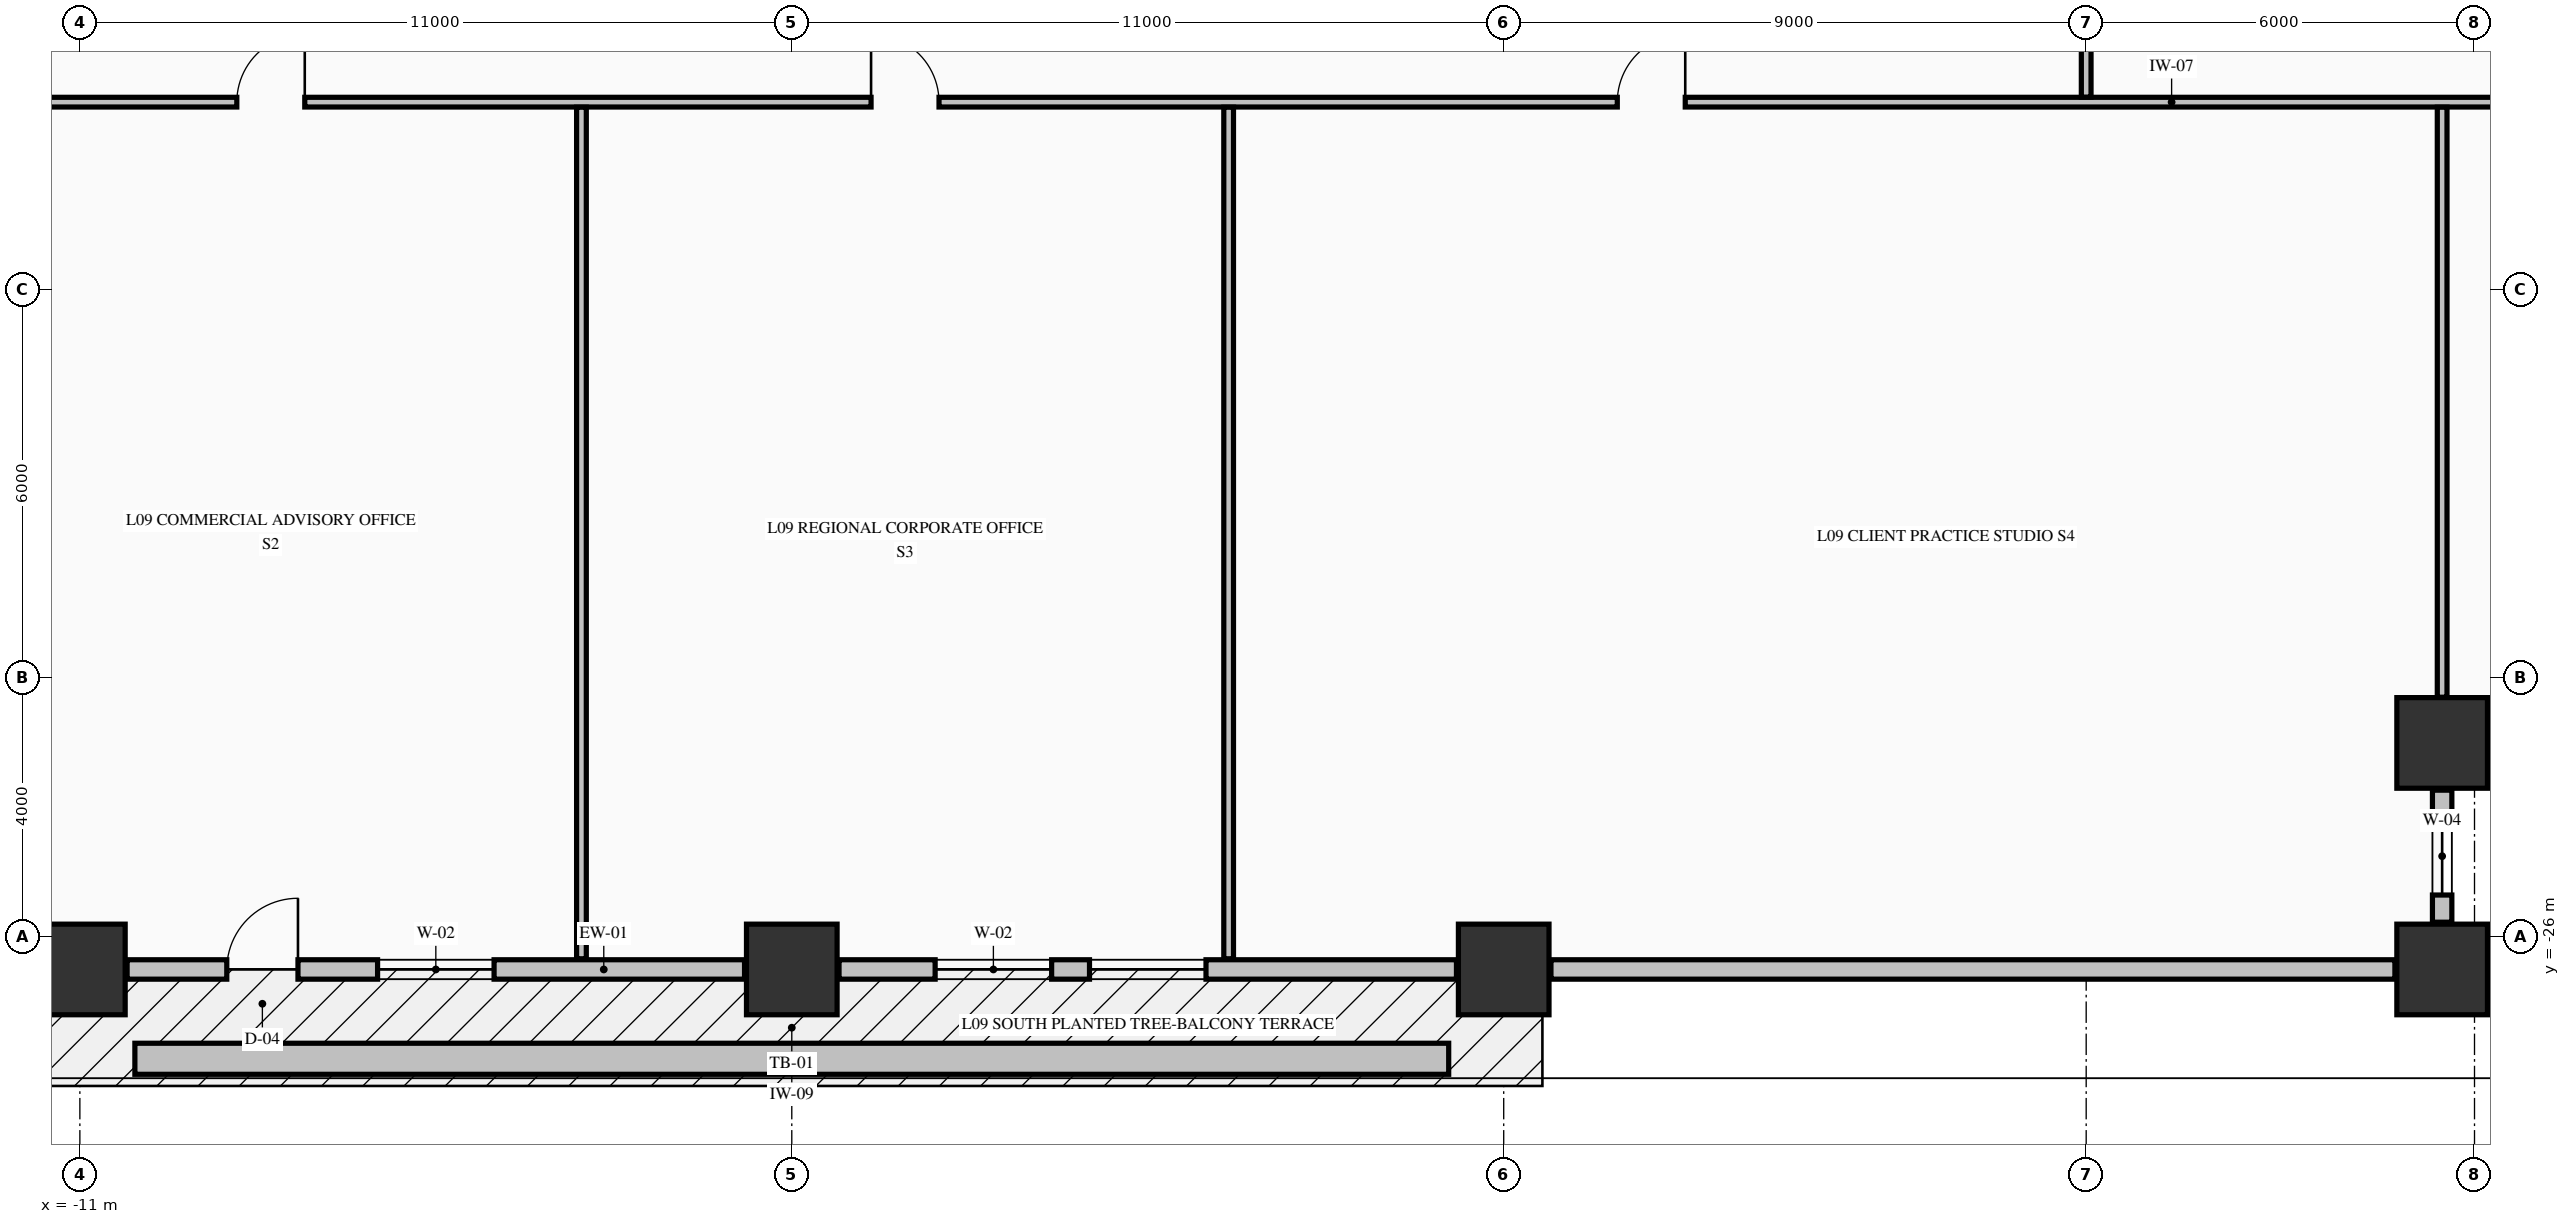
"""IFC4 building model, lengths in metres.
Left out: names, types, materials, properties, quantities, classifications, styles, units other than length and angle.
Written with IfcOpenShell. Run it as: python <this file> out.ifc"""

import sys

from ifc_helpers import new_model, si_unit, direction, frame, frame_2d, origin, origin_2d, place, context, subcontext, project, spatial, rectangle, extrude, element, fill, save


model = new_model("IFC4")
c1 = context("Model", 3, precision=1e-05, world=origin(), true_north=direction((0.0, 1.0)))
c2 = subcontext(c1, "Body", "Model", "MODEL_VIEW")
j1 = project(units=[si_unit("LENGTHUNIT", "METRE"), si_unit("PLANEANGLEUNIT", "RADIAN")], contexts=[c1])
p1 = place(None, origin())
s1 = spatial("IfcSite", under=j1, at=p1, CompositionType="ELEMENT")
p2 = place(p1, origin())
s2 = spatial("IfcBuilding", under=s1, at=p2, CompositionType="ELEMENT")
p3 = place(p2, frame((0.0, 0.0, 41.48)))
s3 = spatial("IfcBuildingStorey", under=s2, at=p3, CompositionType="ELEMENT", Elevation=41.48)
for number, where, z_axis, x_axis in (
    (1, (-11.0, -26.5, -0.25), (0.0, 0.0, 1.0), (1.0, 0.0, 0.0)),
    (2, (0.0, -26.5, -0.25), (0.0, 0.0, 1.0), (1.0, 0.0, 0.0)),
    (3, (11.0, -26.5, -0.25), (0.0, 0.0, 1.0), (1.0, 0.0, 0.0)),
    (4, (25.5, -26.5, -0.25), (0.0, 0.0, 1.0), (1.0, 0.0, 0.0)),
    (5, (25.5, -23.0, -0.25), (0.0, 0.0, 1.0), (1.0, 0.0, 0.0)),
):
    element("IfcColumn", number, at=place(p3, frame(where, z_axis=z_axis, x_axis=x_axis)), inside=s3, PredefinedType="COLUMN", context=c2, shape_type="SweptSolid", body=[
        extrude(rectangle(XDim=1.4, YDim=1.4, at=origin_2d()), origin(), (0.0, 0.0, 1.0), 3.57),
    ])
p4 = place(p3, frame((25.5, -25.77, 0.0), z_axis=(0.0, 0.0, 1.0), x_axis=(0.0, 1.0, 0.0)))
e6 = element("IfcWall", 6, at=p4, inside=s3, PredefinedType="STANDARD", context=c2, shape_type="SweptSolid", body=[
    extrude(rectangle(XDim=2.04, YDim=0.3, at=frame_2d((1.02, 0.0))), origin(), (0.0, 0.0, 1.0), 2.712),
])
p5 = place(p4, frame((0.42, 0.0, 0.82)))
e7 = element("IfcOpeningElement", 7, at=p5, cuts=e6, PredefinedType="OPENING", context=c2, shape_type="SweptSolid", body=[
    extrude(rectangle(XDim=1.2, YDim=1.65, at=frame_2d((0.6, 0.825))), frame((0.0, 0.16, 0.0), z_axis=(0.0, -1.0, 0.0), x_axis=(1.0, 0.0, 0.0)), (0.0, 0.0, 1.0), 0.32),
])
p6 = place(p3, frame((26.23, -23.0, 0.0), z_axis=(0.0, 0.0, 1.0), x_axis=(1.0, 0.0, 0.0)))
e8 = element("IfcWall", 8, at=p6, inside=s3, PredefinedType="STANDARD", context=c2, shape_type="SweptSolid", body=[
    extrude(rectangle(XDim=2.04, YDim=0.3, at=frame_2d((1.02, 0.0))), origin(), (0.0, 0.0, 1.0), 2.712),
])
p7 = place(p6, frame((0.42, 0.0, 0.82)))
e9 = element("IfcOpeningElement", 9, at=p7, cuts=e8, PredefinedType="OPENING", context=c2, shape_type="SweptSolid", body=[
    extrude(rectangle(XDim=1.2, YDim=1.65, at=frame_2d((0.6, 0.825))), frame((0.0, 0.16, 0.0), z_axis=(0.0, -1.0, 0.0), x_axis=(1.0, 0.0, 0.0)), (0.0, 0.0, 1.0), 0.32),
])
p8 = place(p3, frame((-10.27, -26.5, 0.0), z_axis=(0.0, 0.0, 1.0), x_axis=(1.0, 0.0, 0.0)))
e10 = element("IfcWall", 10, at=p8, inside=s3, PredefinedType="STANDARD", context=c2, shape_type="SweptSolid", body=[
    extrude(rectangle(XDim=9.54, YDim=0.3, at=frame_2d((4.77, 0.0))), origin(), (0.0, 0.0, 1.0), 2.712),
])
p9 = place(p8, frame((1.54, 0.0, 0.0)))
e11 = element("IfcOpeningElement", 11, at=p9, cuts=e10, PredefinedType="OPENING", context=c2, shape_type="SweptSolid", body=[
    extrude(rectangle(XDim=1.1, YDim=2.15, at=frame_2d((0.55, 1.075))), frame((0.0, 0.16, 0.0), z_axis=(0.0, -1.0, 0.0), x_axis=(1.0, 0.0, 0.0)), (0.0, 0.0, 1.0), 0.32),
])
p10 = place(p8, frame((3.87, 0.0, 0.78)))
e12 = element("IfcOpeningElement", 12, at=p10, cuts=e10, PredefinedType="OPENING", context=c2, shape_type="SweptSolid", body=[
    extrude(rectangle(XDim=1.8, YDim=1.72, at=frame_2d((0.9, 0.86))), frame((0.0, 0.16, 0.0), z_axis=(0.0, -1.0, 0.0), x_axis=(1.0, 0.0, 0.0)), (0.0, 0.0, 1.0), 0.32),
])
p11 = place(p3, frame((0.73, -26.5, 0.0), z_axis=(0.0, 0.0, 1.0), x_axis=(1.0, 0.0, 0.0)))
e13 = element("IfcWall", 13, at=p11, inside=s3, PredefinedType="STANDARD", context=c2, shape_type="SweptSolid", body=[
    extrude(rectangle(XDim=9.54, YDim=0.3, at=frame_2d((4.77, 0.0))), origin(), (0.0, 0.0, 1.0), 2.712),
])
p12 = place(p11, frame((1.485, 0.0, 0.78)))
e14 = element("IfcOpeningElement", 14, at=p12, cuts=e13, PredefinedType="OPENING", context=c2, shape_type="SweptSolid", body=[
    extrude(rectangle(XDim=1.8, YDim=1.72, at=frame_2d((0.9, 0.86))), frame((0.0, 0.16, 0.0), z_axis=(0.0, -1.0, 0.0), x_axis=(1.0, 0.0, 0.0)), (0.0, 0.0, 1.0), 0.32),
])
p13 = place(p11, frame((3.87, 0.0, 0.78)))
e15 = element("IfcOpeningElement", 15, at=p13, cuts=e13, PredefinedType="OPENING", context=c2, shape_type="SweptSolid", body=[
    extrude(rectangle(XDim=1.8, YDim=1.72, at=frame_2d((0.9, 0.86))), frame((0.0, 0.16, 0.0), z_axis=(0.0, -1.0, 0.0), x_axis=(1.0, 0.0, 0.0)), (0.0, 0.0, 1.0), 0.32),
])
p14 = place(p3, frame((11.73, -26.5, 0.0), z_axis=(0.0, 0.0, 1.0), x_axis=(1.0, 0.0, 0.0)))
e16 = element("IfcWall", 16, at=p14, inside=s3, PredefinedType="STANDARD", context=c2, shape_type="SweptSolid", body=[
    extrude(rectangle(XDim=13.04, YDim=0.3, at=frame_2d((6.52, 0.0))), origin(), (0.0, 0.0, 1.0), 2.712),
])
p15 = place(p3, frame((-23.835, -13.1, 0.0), z_axis=(0.0, 0.0, 1.0), x_axis=(1.0, 0.0, 0.0)))
e17 = element("IfcWall", 17, at=p15, inside=s3, PredefinedType="PARTITIONING", context=c2, shape_type="SweptSolid", body=[
    extrude(rectangle(XDim=52.67, YDim=0.15, at=frame_2d((26.335, 0.0))), origin(), (0.0, 0.0, 1.0), 3.32),
])
p16 = place(p15, frame((6.99, 0.0, 0.0)))
e18 = element("IfcOpeningElement", 18, at=p16, cuts=e17, PredefinedType="OPENING", context=c2, shape_type="SweptSolid", body=[
    extrude(rectangle(XDim=1.05, YDim=2.15, at=frame_2d((0.525, 1.075))), frame((0.0, 0.085, 0.0), z_axis=(0.0, -1.0, 0.0), x_axis=(1.0, 0.0, 0.0)), (0.0, 0.0, 1.0), 0.17),
])
p17 = place(p15, frame((15.26, 0.0, 0.0)))
e19 = element("IfcOpeningElement", 19, at=p17, cuts=e17, PredefinedType="OPENING", context=c2, shape_type="SweptSolid", body=[
    extrude(rectangle(XDim=1.05, YDim=2.15, at=frame_2d((0.525, 1.075))), frame((0.0, 0.085, 0.0), z_axis=(0.0, -1.0, 0.0), x_axis=(1.0, 0.0, 0.0)), (0.0, 0.0, 1.0), 0.17),
])
p18 = place(p15, frame((25.06, 0.0, 0.0)))
e20 = element("IfcOpeningElement", 20, at=p18, cuts=e17, PredefinedType="OPENING", context=c2, shape_type="SweptSolid", body=[
    extrude(rectangle(XDim=1.05, YDim=2.15, at=frame_2d((0.525, 1.075))), frame((0.0, 0.085, 0.0), z_axis=(0.0, -1.0, 0.0), x_axis=(1.0, 0.0, 0.0)), (0.0, 0.0, 1.0), 0.17),
])
p19 = place(p15, frame((36.59, 0.0, 0.0)))
e21 = element("IfcOpeningElement", 21, at=p19, cuts=e17, PredefinedType="OPENING", context=c2, shape_type="SweptSolid", body=[
    extrude(rectangle(XDim=1.05, YDim=2.15, at=frame_2d((0.525, 1.075))), frame((0.0, 0.085, 0.0), z_axis=(0.0, -1.0, 0.0), x_axis=(1.0, 0.0, 0.0)), (0.0, 0.0, 1.0), 0.17),
])
for number, where, z_axis, x_axis in (
    (22, (-3.25, -26.335, 0.0), (0.0, 0.0, 1.0), (0.0, 1.0, 0.0)),
    (23, (6.75, -26.335, 0.0), (0.0, 0.0, 1.0), (0.0, 1.0, 0.0)),
):
    element("IfcWall", number, at=place(p3, frame(where, z_axis=z_axis, x_axis=x_axis)), inside=s3, PredefinedType="PARTITIONING", context=c2, shape_type="SweptSolid", body=[
        extrude(rectangle(XDim=13.157, YDim=0.15, at=frame_2d((6.579, 0.0))), origin(), (0.0, 0.0, 1.0), 3.32),
    ])
p20 = place(p3, frame((20.0, -13.022, 0.0), z_axis=(0.0, 0.0, 1.0), x_axis=(0.0, 1.0, 0.0)))
e24 = element("IfcWall", 24, at=p20, inside=s3, PredefinedType="PARTITIONING", context=c2, shape_type="SweptSolid", body=[
    extrude(rectangle(XDim=2.466, YDim=0.15, at=frame_2d((1.233, 0.0))), origin(), (0.0, 0.0, 1.0), 2.66),
])
p21 = place(p20, frame((1.027, 0.0, 0.0)))
e25 = element("IfcOpeningElement", 25, at=p21, cuts=e24, PredefinedType="OPENING", context=c2, shape_type="SweptSolid", body=[
    extrude(rectangle(XDim=0.95, YDim=2.15, at=frame_2d((0.475, 1.075))), frame((0.0, 0.085, 0.0), z_axis=(0.0, -1.0, 0.0), x_axis=(1.0, 0.0, 0.0)), (0.0, 0.0, 1.0), 0.17),
])
p22 = place(p3, frame((25.5, -22.294, 0.0), z_axis=(0.0, 0.0, 1.0), x_axis=(0.0, 1.0, 0.0)))
e26 = element("IfcWall", 26, at=p22, inside=s3, PredefinedType="PARTITIONING", context=c2, shape_type="SweptSolid", body=[
    extrude(rectangle(XDim=9.116, YDim=0.15, at=frame_2d((4.558, 0.0))), origin(), (0.0, 0.0, 1.0), 3.32),
])
p23 = place(p3, frame((-10.15, -27.88, -0.04), z_axis=(0.0, 0.0, 1.0), x_axis=(1.0, 0.0, 0.0)))
e27 = element("IfcWall", 27, at=p23, inside=s3, PredefinedType="PARAPET", context=c2, shape_type="SweptSolid", body=[
    extrude(rectangle(XDim=20.3, YDim=0.48, at=frame_2d((10.15, 0.0))), origin(), (0.0, 0.0, 1.0), 0.52),
])
p24 = place(p5, origin())
e28 = element("IfcWindow", 28, at=p24, inside=s3, PartitioningType="SINGLE_PANEL", PredefinedType="WINDOW", context=c2, shape_type="SweptSolid", body=[
    extrude(rectangle(XDim=1.2, YDim=1.65, at=frame_2d((0.6, 0.825))), frame((0.0, 0.03, 0.0), z_axis=(0.0, -1.0, 0.0), x_axis=(1.0, 0.0, 0.0)), (0.0, 0.0, 1.0), 0.06),
])
fill(e7, e28)
p25 = place(p9, origin())
e29 = element("IfcDoor", 29, at=p25, inside=s3, OperationType="SINGLE_SWING_RIGHT", PredefinedType="DOOR", context=c2, shape_type="SweptSolid", body=[
    extrude(rectangle(XDim=1.1, YDim=2.15, at=frame_2d((0.55, 1.075))), frame((0.0, 0.025, 0.0), z_axis=(0.0, -1.0, 0.0), x_axis=(1.0, 0.0, 0.0)), (0.0, 0.0, 1.0), 0.05),
])
fill(e11, e29)
p26 = place(p10, origin())
e30 = element("IfcWindow", 30, at=p26, inside=s3, PartitioningType="SINGLE_PANEL", PredefinedType="WINDOW", context=c2, shape_type="SweptSolid", body=[
    extrude(rectangle(XDim=1.8, YDim=1.72, at=frame_2d((0.9, 0.86))), frame((0.0, 0.03, 0.0), z_axis=(0.0, -1.0, 0.0), x_axis=(1.0, 0.0, 0.0)), (0.0, 0.0, 1.0), 0.06),
])
fill(e12, e30)
p27 = place(p12, origin())
e31 = element("IfcWindow", 31, at=p27, inside=s3, PartitioningType="SINGLE_PANEL", PredefinedType="WINDOW", context=c2, shape_type="SweptSolid", body=[
    extrude(rectangle(XDim=1.8, YDim=1.72, at=frame_2d((0.9, 0.86))), frame((0.0, 0.03, 0.0), z_axis=(0.0, -1.0, 0.0), x_axis=(1.0, 0.0, 0.0)), (0.0, 0.0, 1.0), 0.06),
])
fill(e14, e31)
p28 = place(p13, origin())
e32 = element("IfcWindow", 32, at=p28, inside=s3, PartitioningType="SINGLE_PANEL", PredefinedType="WINDOW", context=c2, shape_type="SweptSolid", body=[
    extrude(rectangle(XDim=1.8, YDim=1.72, at=frame_2d((0.9, 0.86))), frame((0.0, 0.03, 0.0), z_axis=(0.0, -1.0, 0.0), x_axis=(1.0, 0.0, 0.0)), (0.0, 0.0, 1.0), 0.06),
])
fill(e15, e32)
p29 = place(p17, origin())
e33 = element("IfcDoor", 33, at=p29, inside=s3, OperationType="SINGLE_SWING_RIGHT", PredefinedType="DOOR", context=c2, shape_type="SweptSolid", body=[
    extrude(rectangle(XDim=1.05, YDim=2.15, at=frame_2d((0.525, 1.075))), frame((0.0, 0.025, 0.0), z_axis=(0.0, -1.0, 0.0), x_axis=(1.0, 0.0, 0.0)), (0.0, 0.0, 1.0), 0.05),
])
fill(e19, e33)
p30 = place(p18, origin())
e34 = element("IfcDoor", 34, at=p30, inside=s3, OperationType="SINGLE_SWING_LEFT", PredefinedType="DOOR", context=c2, shape_type="SweptSolid", body=[
    extrude(rectangle(XDim=1.05, YDim=2.15, at=frame_2d((0.525, 1.075))), frame((0.0, 0.025, 0.0), z_axis=(0.0, -1.0, 0.0), x_axis=(1.0, 0.0, 0.0)), (0.0, 0.0, 1.0), 0.05),
])
fill(e20, e34)
p31 = place(p19, origin())
e35 = element("IfcDoor", 35, at=p31, inside=s3, OperationType="SINGLE_SWING_RIGHT", PredefinedType="DOOR", context=c2, shape_type="SweptSolid", body=[
    extrude(rectangle(XDim=1.05, YDim=2.15, at=frame_2d((0.525, 1.075))), frame((0.0, 0.025, 0.0), z_axis=(0.0, -1.0, 0.0), x_axis=(1.0, 0.0, 0.0)), (0.0, 0.0, 1.0), 0.05),
])
fill(e21, e35)
save(model, sys.argv[1])
